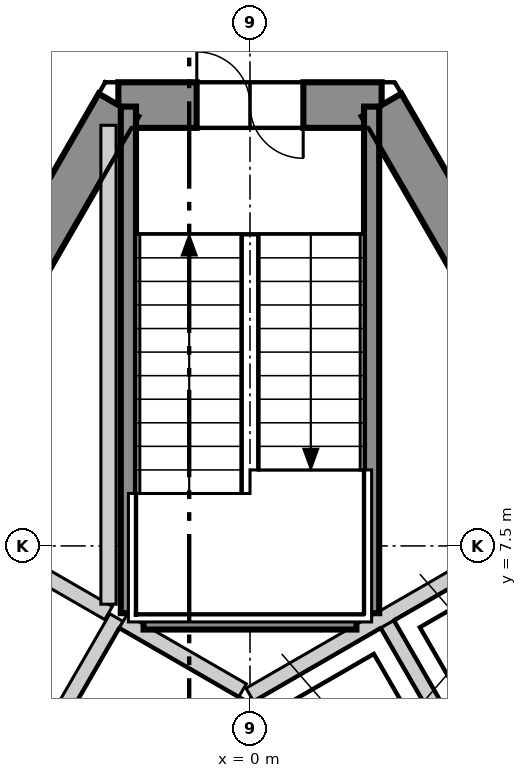
"""IFC4 building model, lengths in metres.
Left out: names, types, materials, properties, quantities, classifications, styles, units other than length and angle.
Written with IfcOpenShell. Run it as: python <this file> out.ifc"""

import sys

from ifc_helpers import new_model, si_unit, direction, frame, frame_2d, origin, place, context, subcontext, project, spatial, polyline, rectangle, outline, extrude, element, fill, save


model = new_model("IFC4")
c1 = context("Model", 3, precision=1e-05, world=origin(), true_north=direction((0.0, 1.0)))
c2 = subcontext(c1, "Body", "Model", "MODEL_VIEW")
j1 = project(units=[si_unit("LENGTHUNIT", "METRE"), si_unit("PLANEANGLEUNIT", "RADIAN")], contexts=[c1])
p1 = place(None, origin())
s1 = spatial("IfcSite", under=j1, at=p1, CompositionType="ELEMENT")
p2 = place(p1, origin())
s2 = spatial("IfcBuilding", under=s1, at=p2, CompositionType="ELEMENT")
p3 = place(p2, frame((0.0, 0.0, 311.5)))
s3 = spatial("IfcBuildingStorey", under=s2, at=p3, CompositionType="ELEMENT", Elevation=311.5)
p4 = place(p3, frame((1.732, 13.3, -0.3), z_axis=(0.0, 0.0, 1.0), x_axis=(-1.0, 0.0, 0.0)))
e1 = element("IfcWall", 1, at=p4, inside=s3, PredefinedType="SHEAR", context=c2, shape_type="SweptSolid", body=[
    extrude(outline(polyline([(-0.173, -0.3), (1.732, -0.3), (3.637, -0.3), (3.291, 0.3), (1.732, 0.3), (0.173, 0.3), (-0.173, -0.3)])), origin(), (0.0, 0.0, 1.0), 3.6),
])
p5 = place(p4, frame((1.032, 0.0, 0.3)))
e2 = element("IfcOpeningElement", 2, at=p5, cuts=e1, PredefinedType="OPENING", context=c2, shape_type="SweptSolid", body=[
    extrude(rectangle(XDim=1.4, YDim=2.1, at=frame_2d((0.7, 1.05))), frame((0.0, 0.31, 0.0), z_axis=(0.0, -1.0, 0.0), x_axis=(1.0, 0.0, 0.0)), (0.0, 0.0, 1.0), 0.62),
])
p6 = place(p3, frame((-1.732, 13.3, -0.3), z_axis=(0.0, 0.0, 1.0), x_axis=(-0.500000539815, -0.866025092122, 0.0)))
e3 = element("IfcWall", 3, at=p6, inside=s3, PredefinedType="SHEAR", context=c2, shape_type="SweptSolid", body=[
    extrude(outline(polyline([(-0.173, -0.3), (1.795, -0.3), (3.763, -0.3), (5.732, -0.3), (7.7, -0.3), (9.668, -0.301), (11.637, -0.301), (13.605, -0.301), (15.573, -0.301), (17.542, -0.301), (19.51, -0.301), (21.478, -0.301), (21.131, 0.3), (19.226, 0.3), (17.321, 0.3), (15.415, 0.3), (13.51, 0.3), (11.605, 0.3), (9.699, 0.3), (7.794, 0.3), (5.889, 0.3), (3.984, 0.3), (2.078, 0.3), (0.173, 0.3), (-0.173, -0.3)])), origin(), (0.0, 0.0, 1.0), 3.6),
])
p7 = place(p6, frame((10.102, 0.0, 0.3)))
e4 = element("IfcOpeningElement", 4, at=p7, cuts=e3, PredefinedType="OPENING", context=c2, shape_type="SweptSolid", body=[
    extrude(rectangle(XDim=1.1, YDim=2.1, at=frame_2d((0.55, 1.05))), frame((0.0, 0.31, 0.0), z_axis=(0.0, -1.0, 0.0), x_axis=(1.0, 0.0, 0.0)), (0.0, 0.0, 1.0), 0.621),
])
p8 = place(p6, frame((16.378, 0.0, 0.3)))
e5 = element("IfcOpeningElement", 5, at=p8, cuts=e3, PredefinedType="OPENING", context=c2, shape_type="SweptSolid", body=[
    extrude(rectangle(XDim=0.9, YDim=2.1, at=frame_2d((0.45, 1.05))), frame((0.0, 0.31, 0.0), z_axis=(0.0, -1.0, 0.0), x_axis=(1.0, 0.0, 0.0)), (0.0, 0.0, 1.0), 0.621),
])
p9 = place(p6, frame((4.106, 0.0, 0.3)))
e6 = element("IfcOpeningElement", 6, at=p9, cuts=e3, PredefinedType="OPENING", context=c2, shape_type="SweptSolid", body=[
    extrude(rectangle(XDim=1.0, YDim=2.1, at=frame_2d((0.5, 1.05))), frame((0.0, 0.31, 0.0), z_axis=(0.0, -1.0, 0.0), x_axis=(1.0, 0.0, 0.0)), (0.0, 0.0, 1.0), 0.621),
])
p10 = place(p3, frame((12.384, -5.15, -0.3), z_axis=(0.0, 0.0, 1.0), x_axis=(-0.500000539815, 0.866025092122, 0.0)))
e7 = element("IfcWall", 7, at=p10, inside=s3, PredefinedType="SHEAR", context=c2, shape_type="SweptSolid", body=[
    extrude(outline(polyline([(-0.173, -0.301), (1.795, -0.301), (3.763, -0.301), (5.731, -0.301), (7.7, -0.301), (9.668, -0.301), (11.636, -0.301), (13.604, -0.3), (15.573, -0.3), (17.541, -0.3), (19.509, -0.3), (21.477, -0.3), (21.131, 0.3), (19.226, 0.3), (17.321, 0.3), (15.415, 0.3), (13.51, 0.3), (11.605, 0.3), (9.699, 0.3), (7.794, 0.3), (5.889, 0.3), (3.984, 0.3), (2.078, 0.3), (0.173, 0.3), (-0.173, -0.301)])), origin(), (0.0, 0.0, 1.0), 3.6),
])
p11 = place(p10, frame((16.378, 0.0, 0.3)))
e8 = element("IfcOpeningElement", 8, at=p11, cuts=e7, PredefinedType="OPENING", context=c2, shape_type="SweptSolid", body=[
    extrude(rectangle(XDim=0.9, YDim=2.1, at=frame_2d((0.45, 1.05))), frame((0.0, 0.31, 0.0), z_axis=(0.0, -1.0, 0.0), x_axis=(1.0, 0.0, 0.0)), (0.0, 0.0, 1.0), 0.621),
])
p12 = place(p10, frame((4.026, 0.0, 0.3)))
e9 = element("IfcOpeningElement", 9, at=p12, cuts=e7, PredefinedType="OPENING", context=c2, shape_type="SweptSolid", body=[
    extrude(rectangle(XDim=0.9, YDim=2.1, at=frame_2d((0.45, 1.05))), frame((0.0, 0.31, 0.0), z_axis=(0.0, -1.0, 0.0), x_axis=(1.0, 0.0, 0.0)), (0.0, 0.0, 1.0), 0.621),
])
p13 = place(p3, frame((-2.412, 26.948, 0.0), z_axis=(0.0, 0.0, 1.0), x_axis=(-0.500002044679, -0.866024223285, 0.0)))
e10 = element("IfcWall", 10, at=p13, inside=s3, PredefinedType="ELEMENTEDWALL", context=c2, shape_type="SweptSolid", body=[
    extrude(rectangle(XDim=44.243, YDim=0.2, at=frame_2d((22.122, 0.0))), origin(), (0.0, 0.0, 1.0), 3.3),
])
p14 = place(p13, frame((2.056, 0.0, 0.9)))
e11 = element("IfcOpeningElement", 11, at=p14, cuts=e10, PredefinedType="OPENING", context=c2, shape_type="SweptSolid", body=[
    extrude(rectangle(XDim=3.7, YDim=2.2, at=frame_2d((1.85, 1.1))), frame((0.0, 0.11, 0.0), z_axis=(0.0, -1.0, 0.0), x_axis=(1.0, 0.0, 0.0)), (0.0, 0.0, 1.0), 0.22),
])
p15 = place(p13, frame((7.263, 0.0, 0.9)))
e12 = element("IfcOpeningElement", 12, at=p15, cuts=e10, PredefinedType="OPENING", context=c2, shape_type="SweptSolid", body=[
    extrude(rectangle(XDim=3.7, YDim=2.2, at=frame_2d((1.85, 1.1))), frame((0.0, 0.11, 0.0), z_axis=(0.0, -1.0, 0.0), x_axis=(1.0, 0.0, 0.0)), (0.0, 0.0, 1.0), 0.22),
])
p16 = place(p13, frame((12.471, 0.0, 0.9)))
e13 = element("IfcOpeningElement", 13, at=p16, cuts=e10, PredefinedType="OPENING", context=c2, shape_type="SweptSolid", body=[
    extrude(rectangle(XDim=3.7, YDim=2.2, at=frame_2d((1.85, 1.1))), frame((0.0, 0.11, 0.0), z_axis=(0.0, -1.0, 0.0), x_axis=(1.0, 0.0, 0.0)), (0.0, 0.0, 1.0), 0.22),
])
p17 = place(p13, frame((17.678, 0.0, 0.9)))
e14 = element("IfcOpeningElement", 14, at=p17, cuts=e10, PredefinedType="OPENING", context=c2, shape_type="SweptSolid", body=[
    extrude(rectangle(XDim=3.7, YDim=2.2, at=frame_2d((1.85, 1.1))), frame((0.0, 0.11, 0.0), z_axis=(0.0, -1.0, 0.0), x_axis=(1.0, 0.0, 0.0)), (0.0, 0.0, 1.0), 0.22),
])
p18 = place(p13, frame((22.885, 0.0, 0.9)))
e15 = element("IfcOpeningElement", 15, at=p18, cuts=e10, PredefinedType="OPENING", context=c2, shape_type="SweptSolid", body=[
    extrude(rectangle(XDim=3.7, YDim=2.2, at=frame_2d((1.85, 1.1))), frame((0.0, 0.11, 0.0), z_axis=(0.0, -1.0, 0.0), x_axis=(1.0, 0.0, 0.0)), (0.0, 0.0, 1.0), 0.22),
])
p19 = place(p13, frame((28.092, 0.0, 0.9)))
e16 = element("IfcOpeningElement", 16, at=p19, cuts=e10, PredefinedType="OPENING", context=c2, shape_type="SweptSolid", body=[
    extrude(rectangle(XDim=3.7, YDim=2.2, at=frame_2d((1.85, 1.1))), frame((0.0, 0.11, 0.0), z_axis=(0.0, -1.0, 0.0), x_axis=(1.0, 0.0, 0.0)), (0.0, 0.0, 1.0), 0.22),
])
p20 = place(p13, frame((33.3, 0.0, 0.9)))
e17 = element("IfcOpeningElement", 17, at=p20, cuts=e10, PredefinedType="OPENING", context=c2, shape_type="SweptSolid", body=[
    extrude(rectangle(XDim=3.7, YDim=2.2, at=frame_2d((1.85, 1.1))), frame((0.0, 0.11, 0.0), z_axis=(0.0, -1.0, 0.0), x_axis=(1.0, 0.0, 0.0)), (0.0, 0.0, 1.0), 0.22),
])
p21 = place(p13, frame((38.507, 0.0, 0.9)))
e18 = element("IfcOpeningElement", 18, at=p21, cuts=e10, PredefinedType="OPENING", context=c2, shape_type="SweptSolid", body=[
    extrude(rectangle(XDim=3.7, YDim=2.2, at=frame_2d((1.85, 1.1))), frame((0.0, 0.11, 0.0), z_axis=(0.0, -1.0, 0.0), x_axis=(1.0, 0.0, 0.0)), (0.0, 0.0, 1.0), 0.22),
])
p22 = place(p3, frame((24.544, -11.385, 0.0), z_axis=(0.0, 0.0, 1.0), x_axis=(-0.500002044679, 0.866024223285, 0.0)))
e19 = element("IfcWall", 19, at=p22, inside=s3, PredefinedType="ELEMENTEDWALL", context=c2, shape_type="SweptSolid", body=[
    extrude(rectangle(XDim=44.243, YDim=0.2, at=frame_2d((22.122, 0.0))), origin(), (0.0, 0.0, 1.0), 3.3),
])
p23 = place(p22, frame((2.056, 0.0, 0.9)))
e20 = element("IfcOpeningElement", 20, at=p23, cuts=e19, PredefinedType="OPENING", context=c2, shape_type="SweptSolid", body=[
    extrude(rectangle(XDim=3.7, YDim=2.2, at=frame_2d((1.85, 1.1))), frame((0.0, 0.11, 0.0), z_axis=(0.0, -1.0, 0.0), x_axis=(1.0, 0.0, 0.0)), (0.0, 0.0, 1.0), 0.22),
])
p24 = place(p22, frame((7.264, 0.0, 0.9)))
e21 = element("IfcOpeningElement", 21, at=p24, cuts=e19, PredefinedType="OPENING", context=c2, shape_type="SweptSolid", body=[
    extrude(rectangle(XDim=3.7, YDim=2.2, at=frame_2d((1.85, 1.1))), frame((0.0, 0.11, 0.0), z_axis=(0.0, -1.0, 0.0), x_axis=(1.0, 0.0, 0.0)), (0.0, 0.0, 1.0), 0.22),
])
p25 = place(p22, frame((12.471, 0.0, 0.9)))
e22 = element("IfcOpeningElement", 22, at=p25, cuts=e19, PredefinedType="OPENING", context=c2, shape_type="SweptSolid", body=[
    extrude(rectangle(XDim=3.7, YDim=2.2, at=frame_2d((1.85, 1.1))), frame((0.0, 0.11, 0.0), z_axis=(0.0, -1.0, 0.0), x_axis=(1.0, 0.0, 0.0)), (0.0, 0.0, 1.0), 0.22),
])
p26 = place(p22, frame((17.678, 0.0, 0.9)))
e23 = element("IfcOpeningElement", 23, at=p26, cuts=e19, PredefinedType="OPENING", context=c2, shape_type="SweptSolid", body=[
    extrude(rectangle(XDim=3.7, YDim=2.2, at=frame_2d((1.85, 1.1))), frame((0.0, 0.11, 0.0), z_axis=(0.0, -1.0, 0.0), x_axis=(1.0, 0.0, 0.0)), (0.0, 0.0, 1.0), 0.22),
])
p27 = place(p22, frame((22.885, 0.0, 0.9)))
e24 = element("IfcOpeningElement", 24, at=p27, cuts=e19, PredefinedType="OPENING", context=c2, shape_type="SweptSolid", body=[
    extrude(rectangle(XDim=3.7, YDim=2.2, at=frame_2d((1.85, 1.1))), frame((0.0, 0.11, 0.0), z_axis=(0.0, -1.0, 0.0), x_axis=(1.0, 0.0, 0.0)), (0.0, 0.0, 1.0), 0.22),
])
p28 = place(p22, frame((28.093, 0.0, 0.9)))
e25 = element("IfcOpeningElement", 25, at=p28, cuts=e19, PredefinedType="OPENING", context=c2, shape_type="SweptSolid", body=[
    extrude(rectangle(XDim=3.7, YDim=2.2, at=frame_2d((1.85, 1.1))), frame((0.0, 0.11, 0.0), z_axis=(0.0, -1.0, 0.0), x_axis=(1.0, 0.0, 0.0)), (0.0, 0.0, 1.0), 0.22),
])
p29 = place(p22, frame((33.3, 0.0, 0.9)))
e26 = element("IfcOpeningElement", 26, at=p29, cuts=e19, PredefinedType="OPENING", context=c2, shape_type="SweptSolid", body=[
    extrude(rectangle(XDim=3.7, YDim=2.2, at=frame_2d((1.85, 1.1))), frame((0.0, 0.11, 0.0), z_axis=(0.0, -1.0, 0.0), x_axis=(1.0, 0.0, 0.0)), (0.0, 0.0, 1.0), 0.22),
])
p30 = place(p22, frame((38.507, 0.0, 0.9)))
e27 = element("IfcOpeningElement", 27, at=p30, cuts=e19, PredefinedType="OPENING", context=c2, shape_type="SweptSolid", body=[
    extrude(rectangle(XDim=3.7, YDim=2.2, at=frame_2d((1.85, 1.1))), frame((0.0, 0.11, 0.0), z_axis=(0.0, -1.0, 0.0), x_axis=(1.0, 0.0, 0.0)), (0.0, 0.0, 1.0), 0.22),
])
p31 = place(p3, frame((-17.678, -10.12, 0.0), z_axis=(0.0, 0.0, 1.0), x_axis=(0.49998824015, 0.86603219323, 0.0)))
e28 = element("IfcWall", 28, at=p31, inside=s3, PredefinedType="PARTITIONING", context=c2, shape_type="SweptSolid", body=[
    extrude(rectangle(XDim=35.357, YDim=0.15, at=frame_2d((17.678, 0.0))), origin(), (0.0, 0.0, 1.0), 3.3),
])
p32 = place(p31, frame((28.607, 0.0, 0.0)))
e29 = element("IfcOpeningElement", 29, at=p32, cuts=e28, PredefinedType="OPENING", context=c2, shape_type="SweptSolid", body=[
    extrude(rectangle(XDim=1.0, YDim=2.1, at=frame_2d((0.5, 1.05))), frame((0.0, 0.085, 0.0), z_axis=(0.0, -1.0, 0.0), x_axis=(1.0, 0.0, 0.0)), (0.0, 0.0, 1.0), 0.17),
])
p33 = place(p31, frame((13.86, 0.0, 0.0)))
e30 = element("IfcOpeningElement", 30, at=p33, cuts=e28, PredefinedType="OPENING", context=c2, shape_type="SweptSolid", body=[
    extrude(rectangle(XDim=1.0, YDim=2.1, at=frame_2d((0.5, 1.05))), frame((0.0, 0.085, 0.0), z_axis=(0.0, -1.0, 0.0), x_axis=(1.0, 0.0, 0.0)), (0.0, 0.0, 1.0), 0.17),
])
p34 = place(p31, frame((18.96, 0.0, 0.0)))
e31 = element("IfcOpeningElement", 31, at=p34, cuts=e28, PredefinedType="OPENING", context=c2, shape_type="SweptSolid", body=[
    extrude(rectangle(XDim=0.9, YDim=2.1, at=frame_2d((0.45, 1.05))), frame((0.0, 0.085, 0.0), z_axis=(0.0, -1.0, 0.0), x_axis=(1.0, 0.0, 0.0)), (0.0, 0.0, 1.0), 0.17),
])
p35 = place(p31, frame((16.86, 0.0, 0.0)))
e32 = element("IfcOpeningElement", 32, at=p35, cuts=e28, PredefinedType="OPENING", context=c2, shape_type="SweptSolid", body=[
    extrude(rectangle(XDim=0.9, YDim=2.1, at=frame_2d((0.45, 1.05))), frame((0.0, 0.085, 0.0), z_axis=(0.0, -1.0, 0.0), x_axis=(1.0, 0.0, 0.0)), (0.0, 0.0, 1.0), 0.17),
])
p36 = place(p31, frame((8.146, 0.0, 0.0)))
e33 = element("IfcOpeningElement", 33, at=p36, cuts=e28, PredefinedType="OPENING", context=c2, shape_type="SweptSolid", body=[
    extrude(rectangle(XDim=1.0, YDim=2.1, at=frame_2d((0.5, 1.05))), frame((0.0, 0.085, 0.0), z_axis=(0.0, -1.0, 0.0), x_axis=(1.0, 0.0, 0.0)), (0.0, 0.0, 1.0), 0.17),
])
p37 = place(p31, frame((3.038, 0.0, 0.0)))
e34 = element("IfcOpeningElement", 34, at=p37, cuts=e28, PredefinedType="OPENING", context=c2, shape_type="SweptSolid", body=[
    extrude(rectangle(XDim=1.0, YDim=2.1, at=frame_2d((0.5, 1.05))), frame((0.0, 0.085, 0.0), z_axis=(0.0, -1.0, 0.0), x_axis=(1.0, 0.0, 0.0)), (0.0, 0.0, 1.0), 0.17),
])
p38 = place(p3, frame((0.075, 20.37, 0.0), z_axis=(0.0, 0.0, 1.0), x_axis=(0.500006672087, -0.866021551619, 0.0)))
e35 = element("IfcWall", 35, at=p38, inside=s3, PredefinedType="PARTITIONING", context=c2, shape_type="SweptSolid", body=[
    extrude(rectangle(XDim=35.27, YDim=0.15, at=frame_2d((17.635, 0.0))), origin(), (0.0, 0.0, 1.0), 3.3),
])
p39 = place(p38, frame((31.206, 0.0, 0.0)))
e36 = element("IfcOpeningElement", 36, at=p39, cuts=e35, PredefinedType="OPENING", context=c2, shape_type="SweptSolid", body=[
    extrude(rectangle(XDim=1.0, YDim=2.1, at=frame_2d((0.5, 1.05))), frame((0.0, 0.085, 0.0), z_axis=(0.0, -1.0, 0.0), x_axis=(1.0, 0.0, 0.0)), (0.0, 0.0, 1.0), 0.17),
])
p40 = place(p38, frame((19.968, 0.0, 0.0)))
e37 = element("IfcOpeningElement", 37, at=p40, cuts=e35, PredefinedType="OPENING", context=c2, shape_type="SweptSolid", body=[
    extrude(rectangle(XDim=1.0, YDim=2.1, at=frame_2d((0.5, 1.05))), frame((0.0, 0.085, 0.0), z_axis=(0.0, -1.0, 0.0), x_axis=(1.0, 0.0, 0.0)), (0.0, 0.0, 1.0), 0.17),
])
p41 = place(p38, frame((13.353, 0.0, 0.0)))
e38 = element("IfcOpeningElement", 38, at=p41, cuts=e35, PredefinedType="OPENING", context=c2, shape_type="SweptSolid", body=[
    extrude(rectangle(XDim=1.0, YDim=2.1, at=frame_2d((0.5, 1.05))), frame((0.0, 0.085, 0.0), z_axis=(0.0, -1.0, 0.0), x_axis=(1.0, 0.0, 0.0)), (0.0, 0.0, 1.0), 0.17),
])
p42 = place(p38, frame((7.746, 0.0, 0.0)))
e39 = element("IfcOpeningElement", 39, at=p42, cuts=e35, PredefinedType="OPENING", context=c2, shape_type="SweptSolid", body=[
    extrude(rectangle(XDim=1.0, YDim=2.1, at=frame_2d((0.5, 1.05))), frame((0.0, 0.085, 0.0), z_axis=(0.0, -1.0, 0.0), x_axis=(1.0, 0.0, 0.0)), (0.0, 0.0, 1.0), 0.17),
])
p43 = place(p38, frame((3.038, 0.0, 0.0)))
e40 = element("IfcOpeningElement", 40, at=p43, cuts=e35, PredefinedType="OPENING", context=c2, shape_type="SweptSolid", body=[
    extrude(rectangle(XDim=1.0, YDim=2.1, at=frame_2d((0.5, 1.05))), frame((0.0, 0.085, 0.0), z_axis=(0.0, -1.0, 0.0), x_axis=(1.0, 0.0, 0.0)), (0.0, 0.0, 1.0), 0.17),
])
p44 = place(p3, frame((-0.002, 5.541, 0.0), z_axis=(0.0, 0.0, 1.0), x_axis=(0.86600155993, 0.500041296494, 0.0)))
e41 = element("IfcWall", 41, at=p44, inside=s3, PredefinedType="SOLIDWALL", context=c2, shape_type="SweptSolid", body=[
    extrude(rectangle(XDim=4.132, YDim=0.2, at=frame_2d((2.066, 0.0))), origin(), (0.0, 0.0, 1.0), 3.3),
])
p45 = place(p3, frame((1.578, 2.874, 0.0), z_axis=(0.0, 0.0, 1.0), x_axis=(0.866045911672, 0.499964477614, 0.0)))
e42 = element("IfcWall", 42, at=p45, inside=s3, PredefinedType="SOLIDWALL", context=c2, shape_type="SweptSolid", body=[
    extrude(rectangle(XDim=5.327, YDim=0.2, at=frame_2d((2.663, 0.0))), origin(), (0.0, 0.0, 1.0), 3.3),
])
p46 = place(p45, frame((2.496, 0.0, 0.0)))
e43 = element("IfcOpeningElement", 43, at=p46, cuts=e42, PredefinedType="OPENING", context=c2, shape_type="SweptSolid", body=[
    extrude(rectangle(XDim=1.1, YDim=2.1, at=frame_2d((0.55, 1.05))), frame((0.0, 0.11, 0.0), z_axis=(0.0, -1.0, 0.0), x_axis=(1.0, 0.0, 0.0)), (0.0, 0.0, 1.0), 0.22),
])
p47 = place(p3, frame((1.807, 6.47, 0.0), z_axis=(0.0, 0.0, 1.0), x_axis=(0.50012328804, -0.865954211699, 0.0)))
e44 = element("IfcWall", 44, at=p47, inside=s3, PredefinedType="SOLIDWALL", context=c2, shape_type="SweptSolid", body=[
    extrude(rectangle(XDim=2.9, YDim=0.2, at=frame_2d((1.45, 0.0))), origin(), (0.0, 0.0, 1.0), 3.3),
])
p48 = place(p3, frame((-3.489, 7.557, 0.0), z_axis=(0.0, 0.0, 1.0), x_axis=(0.866012558475, -0.500022248069, 0.0)))
e45 = element("IfcWall", 45, at=p48, inside=s3, PredefinedType="SOLIDWALL", context=c2, shape_type="SweptSolid", body=[
    extrude(rectangle(XDim=1.88, YDim=0.2, at=frame_2d((0.94, 0.0))), origin(), (0.0, 0.0, 1.0), 3.3),
])
p49 = place(p3, frame((-3.257, 3.959, 0.0), z_axis=(0.0, 0.0, 1.0), x_axis=(0.50002537861, 0.866010750942, 0.0)))
e46 = element("IfcWall", 46, at=p49, inside=s3, PredefinedType="SOLIDWALL", context=c2, shape_type="SweptSolid", body=[
    extrude(rectangle(XDim=3.0, YDim=0.2, at=frame_2d((1.5, 0.0))), origin(), (0.0, 0.0, 1.0), 3.3),
])
p50 = place(p3, frame((-1.67, 6.507, 0.0), z_axis=(0.0, 0.0, 1.0), x_axis=(0.865941441609, -0.500145398563, 0.0)))
e47 = element("IfcWall", 47, at=p50, inside=s3, PredefinedType="SOLIDWALL", context=c2, shape_type="SweptSolid", body=[
    extrude(rectangle(XDim=1.815, YDim=0.2, at=frame_2d((0.908, 0.0))), origin(), (0.0, 0.0, 1.0), 3.3),
])
p51 = place(p3, frame((-1.862, 6.733, 0.0), z_axis=(0.0, 0.0, 1.0), x_axis=(0.0, 1.0, 0.0)))
e48 = element("IfcWall", 48, at=p51, inside=s3, PredefinedType="SOLIDWALL", context=c2, shape_type="SweptSolid", body=[
    extrude(rectangle(XDim=6.301, YDim=0.2, at=frame_2d((3.15, 0.0))), origin(), (0.0, 0.0, 1.0), 3.3),
])
p52 = place(p3, frame((1.6, 6.615, 0.0), z_axis=(0.0, 0.0, 1.0), x_axis=(0.0, 1.0, 0.0)))
e49 = element("IfcWall", 49, at=p52, inside=s3, PredefinedType="SOLIDWALL", context=c2, shape_type="SweptSolid", body=[
    extrude(rectangle(XDim=6.665, YDim=0.2, at=frame_2d((3.333, 0.0))), origin(), (0.0, 0.0, 1.0), 3.3),
])
p53 = place(p3, frame((-1.4, 6.5, 0.0), z_axis=(0.0, 0.0, 1.0), x_axis=(1.0, 0.0, 0.0)))
e50 = element("IfcWall", 50, at=p53, inside=s3, PredefinedType="SOLIDWALL", context=c2, shape_type="SweptSolid", body=[
    extrude(rectangle(XDim=2.8, YDim=0.2, at=frame_2d((1.4, 0.0))), origin(), (0.0, 0.0, 1.0), 3.3),
])
p54 = place(p3, frame((-1.6, 6.615, 0.0), z_axis=(0.0, 0.0, 1.0), x_axis=(0.0, 1.0, 0.0)))
e51 = element("IfcWall", 51, at=p54, inside=s3, PredefinedType="SOLIDWALL", context=c2, shape_type="SweptSolid", body=[
    extrude(rectangle(XDim=6.665, YDim=0.2, at=frame_2d((3.333, 0.0))), origin(), (0.0, 0.0, 1.0), 3.3),
])
p55 = place(p5, origin())
e52 = element("IfcDoor", 52, at=p55, inside=s3, OperationType="DOUBLE_DOOR_SINGLE_SWING", PredefinedType="DOOR", context=c2, shape_type="SweptSolid", body=[
    extrude(rectangle(XDim=1.4, YDim=2.1, at=frame_2d((0.7, 1.05))), frame((0.0, 0.025, 0.0), z_axis=(0.0, -1.0, 0.0), x_axis=(1.0, 0.0, 0.0)), (0.0, 0.0, 1.0), 0.05),
])
fill(e2, e52)
save(model, sys.argv[1])
